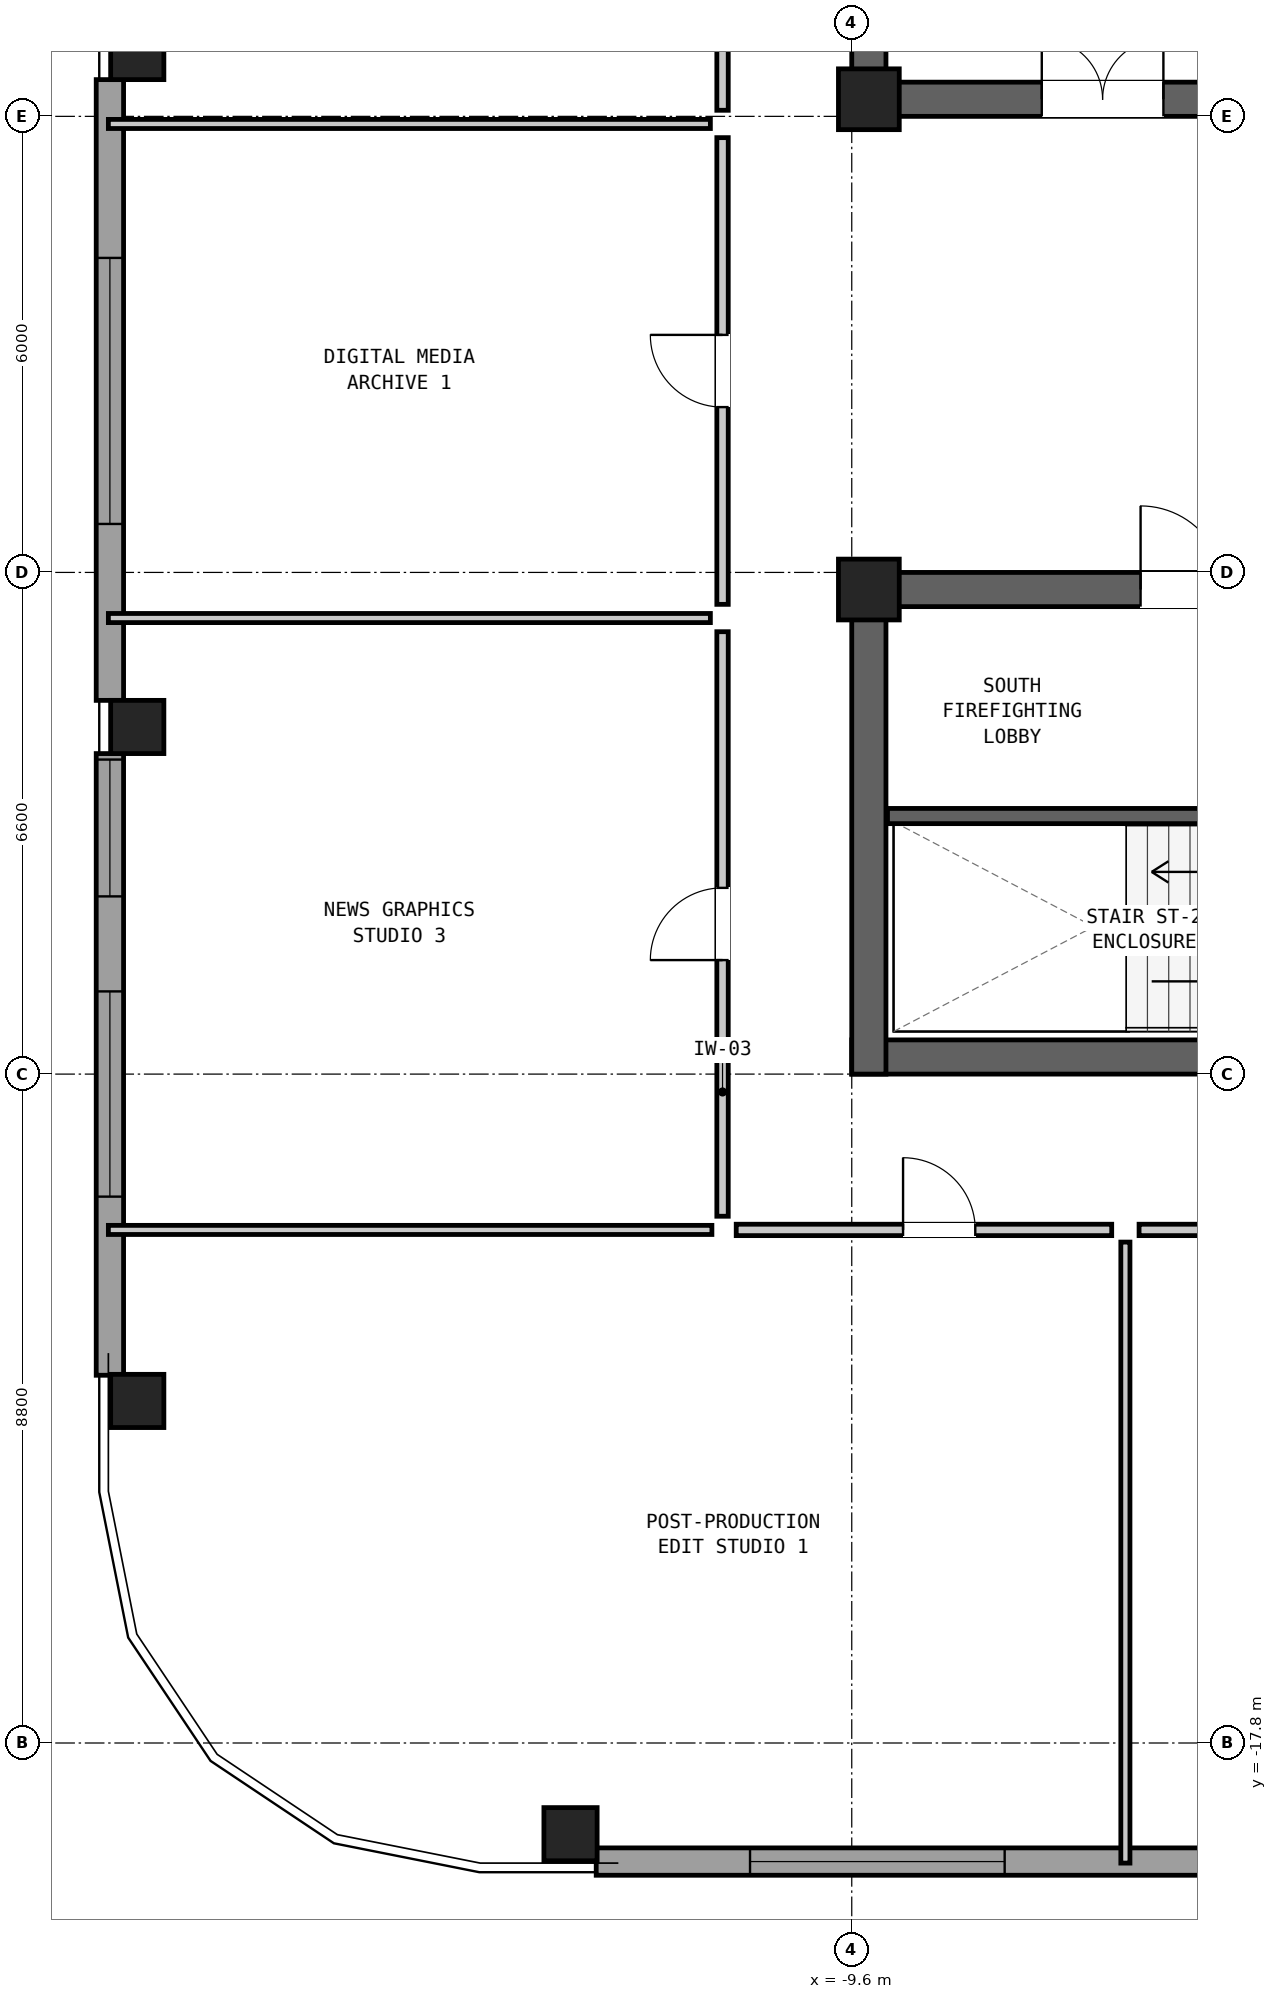
"""IFC4 building model, lengths in metres.
Left out: names, types, materials, properties, quantities, classifications, styles, units other than length and angle.
Written with IfcOpenShell. Run it as: python <this file> out.ifc"""

import sys

from ifc_helpers import new_model, si_unit, direction, frame, frame_2d, origin, origin_2d, place, context, subcontext, project, spatial, rectangle, hollow_rectangle, extrude, element, fill, save


model = new_model("IFC4")
c1 = context("Model", 3, precision=1e-05, world=origin(), true_north=direction((0.0, 1.0)))
c2 = subcontext(c1, "Body", "Model", "MODEL_VIEW")
j1 = project(units=[si_unit("LENGTHUNIT", "METRE"), si_unit("PLANEANGLEUNIT", "RADIAN")], contexts=[c1])
p1 = place(None, origin())
s1 = spatial("IfcSite", under=j1, at=p1, CompositionType="ELEMENT")
p2 = place(p1, origin())
s2 = spatial("IfcBuilding", under=s1, at=p2, CompositionType="ELEMENT")
p3 = place(p2, frame((0.0, 0.0, 220.85)))
s3 = spatial("IfcBuildingStorey", under=s2, at=p3, CompositionType="ELEMENT", Elevation=220.85)
p4 = place(p3, frame((-9.6, 3.825, 0.0), z_axis=(0.0, 0.0, 1.0), x_axis=(1.0, 0.0, 0.0)))
e1 = element("IfcWall", 1, at=p4, inside=s3, PredefinedType="SHEAR", context=c2, shape_type="SweptSolid", body=[
    extrude(rectangle(XDim=19.2, YDim=0.45, at=frame_2d((9.6, 0.0))), origin(), (0.0, 0.0, 1.0), 3.05),
])
p5 = place(p4, frame((14.2, 0.0, 0.0)))
e2 = element("IfcOpeningElement", 2, at=p5, cuts=e1, PredefinedType="OPENING", context=c2, shape_type="SweptSolid", body=[
    extrude(rectangle(XDim=1.1, YDim=2.08, at=frame_2d((0.55, 1.04))), frame((0.0, 0.237, 0.0), z_axis=(0.0, -1.0, 0.0), x_axis=(1.0, 0.0, 0.0)), (0.0, 0.0, 1.0), 0.474),
])
p6 = place(p4, frame((8.2, 0.0, 0.0)))
e3 = element("IfcOpeningElement", 3, at=p6, cuts=e1, PredefinedType="OPENING", context=c2, shape_type="SweptSolid", body=[
    extrude(rectangle(XDim=1.15, YDim=2.1, at=frame_2d((0.575, 1.05))), frame((0.0, 0.237, 0.0), z_axis=(0.0, -1.0, 0.0), x_axis=(1.0, 0.0, 0.0)), (0.0, 0.0, 1.0), 0.474),
])
p7 = place(p4, frame((2.5, 0.0, 0.0)))
e4 = element("IfcOpeningElement", 4, at=p7, cuts=e1, PredefinedType="OPENING", context=c2, shape_type="SweptSolid", body=[
    extrude(rectangle(XDim=1.6, YDim=2.12, at=frame_2d((0.8, 1.06))), frame((0.0, 0.237, 0.0), z_axis=(0.0, -1.0, 0.0), x_axis=(1.0, 0.0, 0.0)), (0.0, 0.0, 1.0), 0.474),
])
p8 = place(p3, frame((-9.375, 3.6, 0.0), z_axis=(0.0, 0.0, 1.0), x_axis=(0.0, 1.0, 0.0)))
e5 = element("IfcWall", 5, at=p8, inside=s3, PredefinedType="SHEAR", context=c2, shape_type="SweptSolid", body=[
    extrude(rectangle(XDim=6.6, YDim=0.45, at=frame_2d((3.3, 0.0))), origin(), (0.0, 0.0, 1.0), 3.05),
])
p9 = place(p3, frame((-9.6, -8.775, 0.0), z_axis=(0.0, 0.0, 1.0), x_axis=(1.0, 0.0, 0.0)))
e6 = element("IfcWall", 6, at=p9, inside=s3, PredefinedType="SHEAR", context=c2, shape_type="SweptSolid", body=[
    extrude(rectangle(XDim=19.2, YDim=0.45, at=frame_2d((9.6, 0.0))), origin(), (0.0, 0.0, 1.0), 3.05),
])
p10 = place(p3, frame((-9.6, -2.625, 0.0), z_axis=(0.0, 0.0, 1.0), x_axis=(1.0, 0.0, 0.0)))
e7 = element("IfcWall", 7, at=p10, inside=s3, PredefinedType="SHEAR", context=c2, shape_type="SweptSolid", body=[
    extrude(rectangle(XDim=19.2, YDim=0.45, at=frame_2d((9.6, 0.0))), origin(), (0.0, 0.0, 1.0), 3.05),
])
p11 = place(p10, frame((3.8, 0.0, 0.0)))
e8 = element("IfcOpeningElement", 8, at=p11, cuts=e7, PredefinedType="OPENING", context=c2, shape_type="SweptSolid", body=[
    extrude(rectangle(XDim=1.1, YDim=2.08, at=frame_2d((0.55, 1.04))), frame((0.0, 0.237, 0.0), z_axis=(0.0, -1.0, 0.0), x_axis=(1.0, 0.0, 0.0)), (0.0, 0.0, 1.0), 0.474),
])
p12 = place(p10, frame((10.15, 0.0, 0.0)))
e9 = element("IfcOpeningElement", 9, at=p12, cuts=e7, PredefinedType="OPENING", context=c2, shape_type="SweptSolid", body=[
    extrude(rectangle(XDim=0.9, YDim=2.05, at=frame_2d((0.45, 1.025))), frame((0.0, 0.237, 0.0), z_axis=(0.0, -1.0, 0.0), x_axis=(1.0, 0.0, 0.0)), (0.0, 0.0, 1.0), 0.474),
])
p13 = place(p10, frame((12.1, 0.0, 0.0)))
e10 = element("IfcOpeningElement", 10, at=p13, cuts=e7, PredefinedType="OPENING", context=c2, shape_type="SweptSolid", body=[
    extrude(rectangle(XDim=0.95, YDim=2.1, at=frame_2d((0.475, 1.05))), frame((0.0, 0.237, 0.0), z_axis=(0.0, -1.0, 0.0), x_axis=(1.0, 0.0, 0.0)), (0.0, 0.0, 1.0), 0.474),
])
p14 = place(p10, frame((14.8, 0.0, 0.0)))
e11 = element("IfcOpeningElement", 11, at=p14, cuts=e7, PredefinedType="OPENING", context=c2, shape_type="SweptSolid", body=[
    extrude(rectangle(XDim=1.6, YDim=2.12, at=frame_2d((0.8, 1.06))), frame((0.0, 0.237, 0.0), z_axis=(0.0, -1.0, 0.0), x_axis=(1.0, 0.0, 0.0)), (0.0, 0.0, 1.0), 0.474),
])
p15 = place(p3, frame((-9.375, -9.0, 0.0), z_axis=(0.0, 0.0, 1.0), x_axis=(0.0, 1.0, 0.0)))
e12 = element("IfcWall", 12, at=p15, inside=s3, PredefinedType="SHEAR", context=c2, shape_type="SweptSolid", body=[
    extrude(rectangle(XDim=6.6, YDim=0.45, at=frame_2d((3.3, 0.0))), origin(), (0.0, 0.0, 1.0), 3.05),
])
for number, where, z_axis, x_axis in (
    (13, (-13.3, -19.0, 0.0), (0.0, 0.0, 1.0), (1.0, 0.0, 0.0)),
    (14, (-19.0, 4.433, 0.0), (0.0, 0.0, 1.0), (0.0, 1.0, 0.0)),
    (15, (-19.0, -4.433, 0.0), (0.0, 0.0, 1.0), (0.0, 1.0, 0.0)),
    (16, (-19.0, -13.3, 0.0), (0.0, 0.0, 1.0), (0.0, 1.0, 0.0)),
):
    element("IfcColumn", number, at=place(p3, frame(where, z_axis=z_axis, x_axis=x_axis)), inside=s3, PredefinedType="COLUMN", context=c2, shape_type="SweptSolid", body=[
        extrude(hollow_rectangle(XDim=0.7, YDim=0.7, WallThickness=0.045, at=origin_2d()), origin(), (0.0, 0.0, 1.0), 3.05),
    ])
for number, where, z_axis, x_axis in (
    (17, (-9.375, 3.825, 0.0), (0.0, 0.0, 1.0), (1.0, 0.0, 0.0)),
    (18, (-9.375, -2.625, 0.0), (0.0, 0.0, 1.0), (1.0, 0.0, 0.0)),
):
    element("IfcColumn", number, at=place(p3, frame(where, z_axis=z_axis, x_axis=x_axis)), inside=s3, PredefinedType="COLUMN", context=c2, shape_type="SweptSolid", body=[
        extrude(rectangle(XDim=0.8, YDim=0.8, at=origin_2d()), origin(), (0.0, 0.0, 1.0), 3.05),
    ])
p16 = place(p3, frame((-4.783, -19.36, 0.0), z_axis=(0.0, 0.0, 1.0), x_axis=(-1.0, 0.0, 0.0)))
e19 = element("IfcWall", 19, at=p16, inside=s3, PredefinedType="SOLIDWALL", context=c2, shape_type="SweptSolid", body=[
    extrude(rectangle(XDim=8.179, YDim=0.36, at=frame_2d((4.089, 0.0))), origin(), (0.0, 0.0, 1.0), 2.374),
])
p17 = place(p16, frame((2.805, 0.0, 0.2)))
e20 = element("IfcOpeningElement", 20, at=p17, cuts=e19, PredefinedType="OPENING", context=c2, shape_type="SweptSolid", body=[
    extrude(rectangle(XDim=3.35, YDim=0.9, at=frame_2d((1.675, 0.45))), frame((0.0, 0.192, 0.0), z_axis=(0.0, -1.0, 0.0), x_axis=(1.0, 0.0, 0.0)), (0.0, 0.0, 1.0), 0.384),
])
p18 = place(p3, frame((-19.36, -12.962, 0.0), z_axis=(0.0, 0.0, 1.0), x_axis=(0.0, 1.0, 0.0)))
e21 = element("IfcWall", 21, at=p18, inside=s3, PredefinedType="SOLIDWALL", context=c2, shape_type="SweptSolid", body=[
    extrude(rectangle(XDim=8.179, YDim=0.36, at=frame_2d((4.089, 0.0))), origin(), (0.0, 0.0, 1.0), 2.374),
])
p19 = place(p18, frame((2.35, 0.0, 0.2)))
e22 = element("IfcOpeningElement", 22, at=p19, cuts=e21, PredefinedType="OPENING", context=c2, shape_type="SweptSolid", body=[
    extrude(rectangle(XDim=2.7, YDim=1.2, at=frame_2d((1.35, 0.6))), frame((0.0, 0.192, 0.0), z_axis=(0.0, -1.0, 0.0), x_axis=(1.0, 0.0, 0.0)), (0.0, 0.0, 1.0), 0.384),
])
p20 = place(p18, frame((6.3, 0.0, 1.15)))
e23 = element("IfcOpeningElement", 23, at=p20, cuts=e21, PredefinedType="OPENING", context=c2, shape_type="SweptSolid", body=[
    extrude(rectangle(XDim=1.8, YDim=1.05, at=frame_2d((0.9, 0.525))), frame((0.0, 0.192, 0.0), z_axis=(0.0, -1.0, 0.0), x_axis=(1.0, 0.0, 0.0)), (0.0, 0.0, 1.0), 0.384),
])
p21 = place(p3, frame((-19.36, -4.083, 0.0), z_axis=(0.0, 0.0, 1.0), x_axis=(0.0, 1.0, 0.0)))
e24 = element("IfcWall", 24, at=p21, inside=s3, PredefinedType="SOLIDWALL", context=c2, shape_type="SweptSolid", body=[
    extrude(rectangle(XDim=8.167, YDim=0.36, at=frame_2d((4.083, 0.0))), origin(), (0.0, 0.0, 1.0), 2.374),
])
p22 = place(p21, frame((2.321, 0.0, 0.2)))
e25 = element("IfcOpeningElement", 25, at=p22, cuts=e24, PredefinedType="OPENING", context=c2, shape_type="SweptSolid", body=[
    extrude(rectangle(XDim=3.5, YDim=0.95, at=frame_2d((1.75, 0.475))), frame((0.0, 0.192, 0.0), z_axis=(0.0, -1.0, 0.0), x_axis=(1.0, 0.0, 0.0)), (0.0, 0.0, 1.0), 0.384),
])
p23 = place(p3, frame((-9.13, -5.605, 0.0), z_axis=(0.0, 0.0, 1.0), x_axis=(1.0, 0.0, 0.0)))
e26 = element("IfcWall", 26, at=p23, inside=s3, PredefinedType="SHEAR", context=c2, shape_type="SweptSolid", body=[
    extrude(rectangle(XDim=6.77, YDim=0.2, at=frame_2d((3.385, 0.0))), origin(), (0.0, 0.0, 1.0), 2.86),
])
p24 = place(p23, frame((5.5, 0.0, 0.0)))
e27 = element("IfcOpeningElement", 27, at=p24, cuts=e26, PredefinedType="OPENING", context=c2, shape_type="SweptSolid", body=[
    extrude(rectangle(XDim=1.05, YDim=2.08, at=frame_2d((0.525, 1.04))), frame((0.0, 0.112, 0.0), z_axis=(0.0, -1.0, 0.0), x_axis=(1.0, 0.0, 0.0)), (0.0, 0.0, 1.0), 0.224),
])
p25 = place(p3, frame((-19.38, -11.05, 0.0), z_axis=(0.0, 0.0, 1.0), x_axis=(1.0, 0.0, 0.0)))
e28 = element("IfcWall", 28, at=p25, inside=s3, PredefinedType="PARTITIONING", context=c2, shape_type="SweptSolid", body=[
    extrude(rectangle(XDim=7.94, YDim=0.12, at=frame_2d((3.97, 0.0))), origin(), (0.0, 0.0, 1.0), 2.86),
])
p26 = place(p3, frame((-6.0, -19.38, 0.0), z_axis=(0.0, 0.0, 1.0), x_axis=(0.0, 1.0, 0.0)))
e29 = element("IfcWall", 29, at=p26, inside=s3, PredefinedType="PARTITIONING", context=c2, shape_type="SweptSolid", body=[
    extrude(rectangle(XDim=8.17, YDim=0.12, at=frame_2d((4.085, 0.0))), origin(), (0.0, 0.0, 1.0), 2.381),
])
for number, where, z_axis, x_axis in (
    (30, (-19.38, -3.0, 0.0), (0.0, 0.0, 1.0), (1.0, 0.0, 0.0)),
    (31, (-19.38, 3.5, 0.0), (0.0, 0.0, 1.0), (1.0, 0.0, 0.0)),
):
    element("IfcWall", number, at=place(p3, frame(where, z_axis=z_axis, x_axis=x_axis)), inside=s3, PredefinedType="PARTITIONING", context=c2, shape_type="SweptSolid", body=[
        extrude(rectangle(XDim=7.92, YDim=0.12, at=frame_2d((3.96, 0.0))), origin(), (0.0, 0.0, 1.0), 1.981),
    ])
p27 = place(p3, frame((-11.12, -11.05, 0.0), z_axis=(0.0, 0.0, 1.0), x_axis=(1.0, 0.0, 0.0)))
e32 = element("IfcWall", 32, at=p27, inside=s3, PredefinedType="PARTITIONING", context=c2, shape_type="SweptSolid", body=[
    extrude(rectangle(XDim=4.94, YDim=0.15, at=frame_2d((2.47, 0.0))), origin(), (0.0, 0.0, 1.0), 2.86),
])
p28 = place(p27, frame((2.195, 0.0, 0.0)))
e33 = element("IfcOpeningElement", 33, at=p28, cuts=e32, PredefinedType="OPENING", context=c2, shape_type="SweptSolid", body=[
    extrude(rectangle(XDim=0.95, YDim=2.1, at=frame_2d((0.475, 1.05))), frame((0.0, 0.087, 0.0), z_axis=(0.0, -1.0, 0.0), x_axis=(1.0, 0.0, 0.0)), (0.0, 0.0, 1.0), 0.174),
])
p29 = place(p3, frame((-5.82, -11.05, 0.0), z_axis=(0.0, 0.0, 1.0), x_axis=(1.0, 0.0, 0.0)))
e34 = element("IfcWall", 34, at=p29, inside=s3, PredefinedType="PARTITIONING", context=c2, shape_type="SweptSolid", body=[
    extrude(rectangle(XDim=7.14, YDim=0.15, at=frame_2d((3.57, 0.0))), origin(), (0.0, 0.0, 1.0), 2.86),
])
p30 = place(p29, frame((3.095, 0.0, 0.0)))
e35 = element("IfcOpeningElement", 35, at=p30, cuts=e34, PredefinedType="OPENING", context=c2, shape_type="SweptSolid", body=[
    extrude(rectangle(XDim=0.95, YDim=2.1, at=frame_2d((0.475, 1.05))), frame((0.0, 0.087, 0.0), z_axis=(0.0, -1.0, 0.0), x_axis=(1.0, 0.0, 0.0)), (0.0, 0.0, 1.0), 0.174),
])
p31 = place(p3, frame((-11.3, -10.87, 0.0), z_axis=(0.0, 0.0, 1.0), x_axis=(0.0, 1.0, 0.0)))
e36 = element("IfcWall", 36, at=p31, inside=s3, PredefinedType="PARTITIONING", context=c2, shape_type="SweptSolid", body=[
    extrude(rectangle(XDim=7.69, YDim=0.15, at=frame_2d((3.845, 0.0))), origin(), (0.0, 0.0, 1.0), 2.86),
])
p32 = place(p31, frame((3.37, 0.0, 0.0)))
e37 = element("IfcOpeningElement", 37, at=p32, cuts=e36, PredefinedType="OPENING", context=c2, shape_type="SweptSolid", body=[
    extrude(rectangle(XDim=0.95, YDim=2.1, at=frame_2d((0.475, 1.05))), frame((0.0, 0.087, 0.0), z_axis=(0.0, -1.0, 0.0), x_axis=(1.0, 0.0, 0.0)), (0.0, 0.0, 1.0), 0.174),
])
p33 = place(p3, frame((-11.3, -2.82, 0.0), z_axis=(0.0, 0.0, 1.0), x_axis=(0.0, 1.0, 0.0)))
e38 = element("IfcWall", 38, at=p33, inside=s3, PredefinedType="PARTITIONING", context=c2, shape_type="SweptSolid", body=[
    extrude(rectangle(XDim=6.14, YDim=0.15, at=frame_2d((3.07, 0.0))), origin(), (0.0, 0.0, 1.0), 2.86),
])
p34 = place(p33, frame((2.595, 0.0, 0.0)))
e39 = element("IfcOpeningElement", 39, at=p34, cuts=e38, PredefinedType="OPENING", context=c2, shape_type="SweptSolid", body=[
    extrude(rectangle(XDim=0.95, YDim=2.1, at=frame_2d((0.475, 1.05))), frame((0.0, 0.087, 0.0), z_axis=(0.0, -1.0, 0.0), x_axis=(1.0, 0.0, 0.0)), (0.0, 0.0, 1.0), 0.174),
])
p35 = place(p3, frame((-11.3, 3.68, 0.0), z_axis=(0.0, 0.0, 1.0), x_axis=(0.0, 1.0, 0.0)))
e40 = element("IfcWall", 40, at=p35, inside=s3, PredefinedType="PARTITIONING", context=c2, shape_type="SweptSolid", body=[
    extrude(rectangle(XDim=8.39, YDim=0.15, at=frame_2d((4.195, 0.0))), origin(), (0.0, 0.0, 1.0), 2.86),
])
p36 = place(p35, frame((3.72, 0.0, 0.0)))
e41 = element("IfcOpeningElement", 41, at=p36, cuts=e40, PredefinedType="OPENING", context=c2, shape_type="SweptSolid", body=[
    extrude(rectangle(XDim=0.95, YDim=2.1, at=frame_2d((0.475, 1.05))), frame((0.0, 0.087, 0.0), z_axis=(0.0, -1.0, 0.0), x_axis=(1.0, 0.0, 0.0)), (0.0, 0.0, 1.0), 0.174),
])
p37 = place(p17, origin())
e42 = element("IfcWindow", 42, at=p37, inside=s3, PartitioningType="SINGLE_PANEL", PredefinedType="WINDOW", context=c2, shape_type="SweptSolid", body=[
    extrude(rectangle(XDim=3.35, YDim=0.9, at=frame_2d((1.675, 0.45))), frame((0.0, 0.03, 0.0), z_axis=(0.0, -1.0, 0.0), x_axis=(1.0, 0.0, 0.0)), (0.0, 0.0, 1.0), 0.06),
])
fill(e20, e42)
p38 = place(p19, origin())
e43 = element("IfcWindow", 43, at=p38, inside=s3, PartitioningType="SINGLE_PANEL", PredefinedType="WINDOW", context=c2, shape_type="SweptSolid", body=[
    extrude(rectangle(XDim=2.7, YDim=1.2, at=frame_2d((1.35, 0.6))), frame((0.0, 0.03, 0.0), z_axis=(0.0, -1.0, 0.0), x_axis=(1.0, 0.0, 0.0)), (0.0, 0.0, 1.0), 0.06),
])
fill(e22, e43)
p39 = place(p20, origin())
e44 = element("IfcWindow", 44, at=p39, inside=s3, PartitioningType="SINGLE_PANEL", PredefinedType="WINDOW", context=c2, shape_type="SweptSolid", body=[
    extrude(rectangle(XDim=1.8, YDim=1.05, at=frame_2d((0.9, 0.525))), frame((0.0, 0.03, 0.0), z_axis=(0.0, -1.0, 0.0), x_axis=(1.0, 0.0, 0.0)), (0.0, 0.0, 1.0), 0.06),
])
fill(e23, e44)
p40 = place(p22, origin())
e45 = element("IfcWindow", 45, at=p40, inside=s3, PartitioningType="SINGLE_PANEL", PredefinedType="WINDOW", context=c2, shape_type="SweptSolid", body=[
    extrude(rectangle(XDim=3.5, YDim=0.95, at=frame_2d((1.75, 0.475))), frame((0.0, 0.03, 0.0), z_axis=(0.0, -1.0, 0.0), x_axis=(1.0, 0.0, 0.0)), (0.0, 0.0, 1.0), 0.06),
])
fill(e25, e45)
p41 = place(p7, origin())
e46 = element("IfcDoor", 46, at=p41, inside=s3, OperationType="DOUBLE_DOOR_SINGLE_SWING", PredefinedType="DOOR", context=c2, shape_type="SweptSolid", body=[
    extrude(rectangle(XDim=1.6, YDim=2.12, at=frame_2d((0.8, 1.06))), frame((0.0, 0.025, 0.0), z_axis=(0.0, -1.0, 0.0), x_axis=(1.0, 0.0, 0.0)), (0.0, 0.0, 1.0), 0.05),
])
fill(e4, e46)
p42 = place(p11, origin())
e47 = element("IfcDoor", 47, at=p42, inside=s3, OperationType="SINGLE_SWING_LEFT", PredefinedType="DOOR", context=c2, shape_type="SweptSolid", body=[
    extrude(rectangle(XDim=1.1, YDim=2.08, at=frame_2d((0.55, 1.04))), frame((0.0, 0.025, 0.0), z_axis=(0.0, -1.0, 0.0), x_axis=(1.0, 0.0, 0.0)), (0.0, 0.0, 1.0), 0.05),
])
fill(e8, e47)
p43 = place(p28, origin())
e48 = element("IfcDoor", 48, at=p43, inside=s3, OperationType="SINGLE_SWING_LEFT", PredefinedType="DOOR", context=c2, shape_type="SweptSolid", body=[
    extrude(rectangle(XDim=0.95, YDim=2.1, at=frame_2d((0.475, 1.05))), frame((0.0, 0.025, 0.0), z_axis=(0.0, -1.0, 0.0), x_axis=(1.0, 0.0, 0.0)), (0.0, 0.0, 1.0), 0.05),
])
fill(e33, e48)
p44 = place(p32, origin())
e49 = element("IfcDoor", 49, at=p44, inside=s3, OperationType="SINGLE_SWING_LEFT", PredefinedType="DOOR", context=c2, shape_type="SweptSolid", body=[
    extrude(rectangle(XDim=0.95, YDim=2.1, at=frame_2d((0.475, 1.05))), frame((0.0, 0.025, 0.0), z_axis=(0.0, -1.0, 0.0), x_axis=(1.0, 0.0, 0.0)), (0.0, 0.0, 1.0), 0.05),
])
fill(e37, e49)
p45 = place(p34, origin())
e50 = element("IfcDoor", 50, at=p45, inside=s3, OperationType="SINGLE_SWING_RIGHT", PredefinedType="DOOR", context=c2, shape_type="SweptSolid", body=[
    extrude(rectangle(XDim=0.95, YDim=2.1, at=frame_2d((0.475, 1.05))), frame((0.0, 0.025, 0.0), z_axis=(0.0, -1.0, 0.0), x_axis=(1.0, 0.0, 0.0)), (0.0, 0.0, 1.0), 0.05),
])
fill(e39, e50)
save(model, sys.argv[1])
